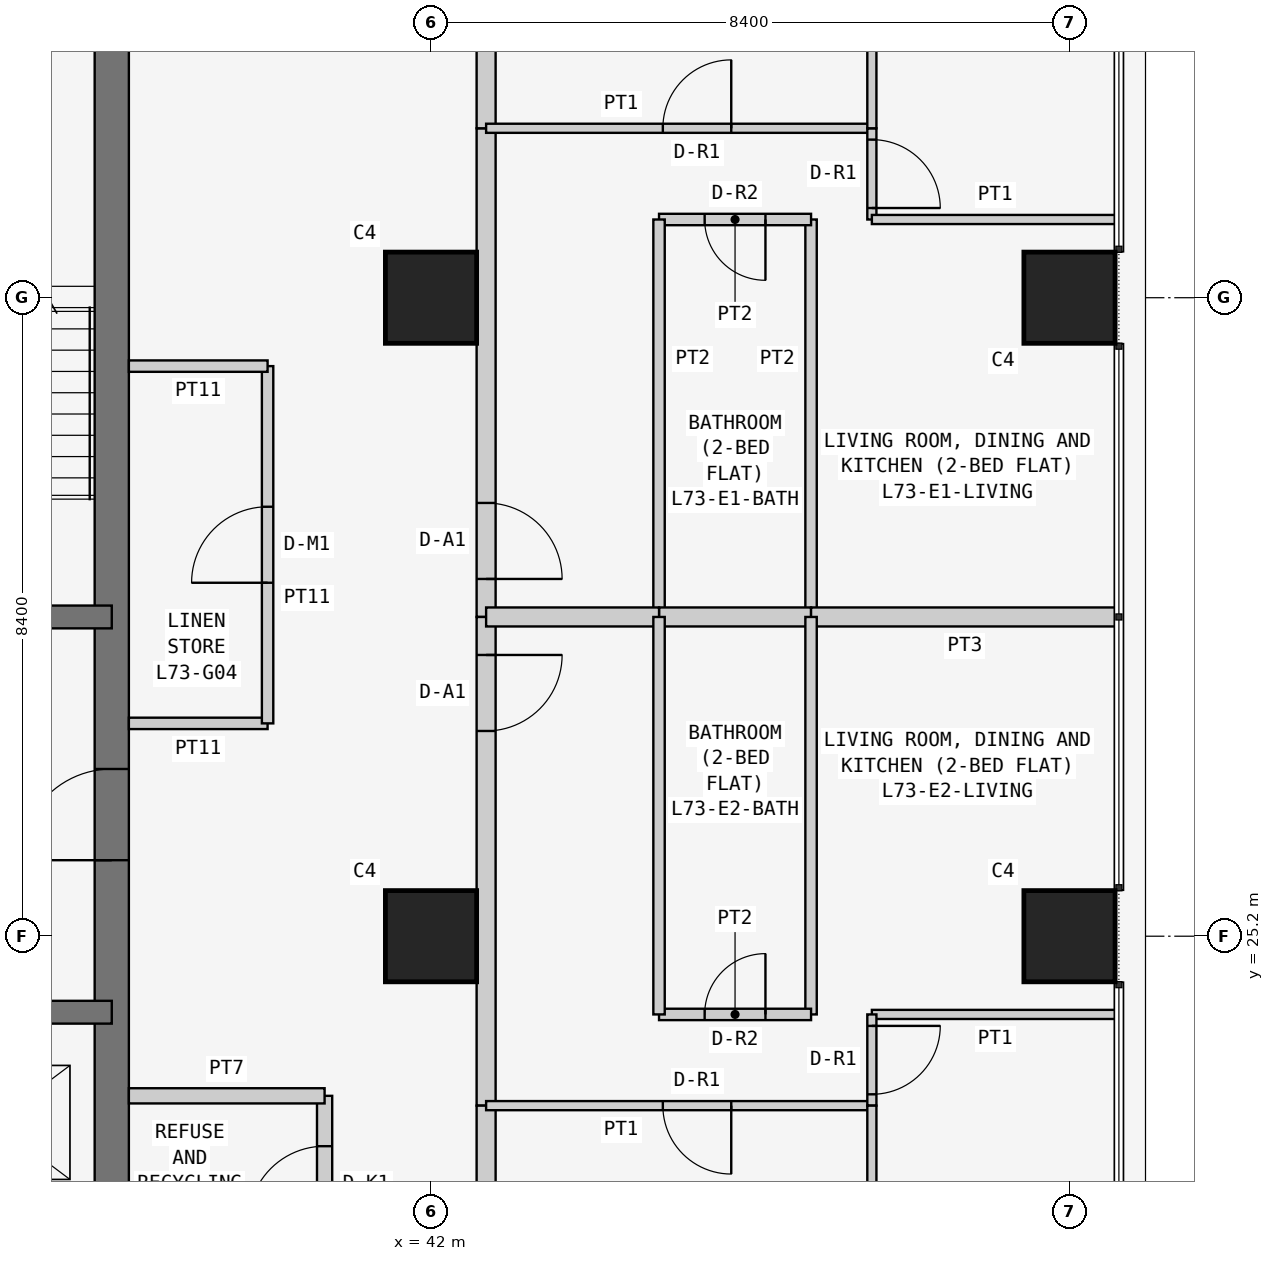
"""IFC4 building model, lengths in metres.
Left out: names, types, materials, properties, quantities, classifications, styles, units other than length and angle.
Written with IfcOpenShell. Run it as: python <this file> out.ifc"""

import sys

from ifc_helpers import new_model, si_unit, direction, frame, frame_2d, origin, origin_2d, place, context, subcontext, project, spatial, rectangle, extrude, element, fill, save


model = new_model("IFC4")
c1 = context("Model", 3, precision=1e-05, world=origin(), true_north=direction((0.0, 1.0)))
c2 = subcontext(c1, "Body", "Model", "MODEL_VIEW")
j1 = project(units=[si_unit("LENGTHUNIT", "METRE"), si_unit("PLANEANGLEUNIT", "RADIAN")], contexts=[c1])
p1 = place(None, origin())
s1 = spatial("IfcSite", under=j1, at=p1, CompositionType="ELEMENT")
p2 = place(p1, origin())
s2 = spatial("IfcBuilding", under=s1, at=p2, CompositionType="ELEMENT")
p3 = place(p2, frame((0.0, 0.0, 279.3)))
s3 = spatial("IfcBuildingStorey", under=s2, at=p3, CompositionType="ELEMENT", Elevation=279.3)
for number, where, z_axis, x_axis in (
    (1, (42.0, 25.2, 0.0), (0.0, 0.0, 1.0), (1.0, 0.0, 0.0)),
    (2, (42.0, 33.6, 0.0), (0.0, 0.0, 1.0), (1.0, 0.0, 0.0)),
    (3, (50.4, 25.2, 0.0), (0.0, 0.0, 1.0), (1.0, 0.0, 0.0)),
    (4, (50.4, 33.6, 0.0), (0.0, 0.0, 1.0), (1.0, 0.0, 0.0)),
):
    element("IfcColumn", number, at=place(p3, frame(where, z_axis=z_axis, x_axis=x_axis)), inside=s3, PredefinedType="COLUMN", context=c2, shape_type="SweptSolid", body=[
        extrude(rectangle(XDim=1.2, YDim=1.2, at=origin_2d()), origin(), (0.0, 0.0, 1.0), 3.6),
    ])
p4 = place(p3, frame((37.8, 21.0, 0.0), z_axis=(0.0, 0.0, 1.0), x_axis=(0.0, 1.0, 0.0)))
e5 = element("IfcWall", 5, at=p4, inside=s3, PredefinedType="SHEAR", context=c2, shape_type="SweptSolid", body=[
    extrude(rectangle(XDim=17.025, YDim=0.45, at=frame_2d((8.512, 0.0))), origin(), (0.0, 0.0, 1.0), 3.6),
])
p5 = place(p4, frame((5.2, 0.0, 0.0)))
e6 = element("IfcOpeningElement", 6, at=p5, cuts=e5, PredefinedType="OPENING", context=c2, shape_type="SweptSolid", body=[
    extrude(rectangle(XDim=1.2, YDim=2.1, at=frame_2d((0.6, 1.05))), frame((0.0, 0.235, 0.0), z_axis=(0.0, -1.0, 0.0), x_axis=(1.0, 0.0, 0.0)), (0.0, 0.0, 1.0), 0.47),
])
p6 = place(p3, frame((26.6, 24.2, 0.0), z_axis=(0.0, 0.0, 1.0), x_axis=(1.0, 0.0, 0.0)))
e7 = element("IfcWall", 7, at=p6, inside=s3, PredefinedType="SHEAR", context=c2, shape_type="SweptSolid", body=[
    extrude(rectangle(XDim=11.2, YDim=0.3, at=frame_2d((5.6, 0.0))), origin(), (0.0, 0.0, 1.0), 3.6),
])
p7 = place(p6, frame((0.913, 0.0, 0.0)))
e8 = element("IfcOpeningElement", 8, at=p7, cuts=e7, PredefinedType="OPENING", context=c2, shape_type="SweptSolid", body=[
    extrude(rectangle(XDim=1.0, YDim=2.1, at=frame_2d((0.5, 1.05))), frame((0.0, 0.16, 0.0), z_axis=(0.0, -1.0, 0.0), x_axis=(1.0, 0.0, 0.0)), (0.0, 0.0, 1.0), 0.32),
])
p8 = place(p6, frame((3.7, 0.0, 0.0)))
e9 = element("IfcOpeningElement", 9, at=p8, cuts=e7, PredefinedType="OPENING", context=c2, shape_type="SweptSolid", body=[
    extrude(rectangle(XDim=1.0, YDim=2.1, at=frame_2d((0.5, 1.05))), frame((0.0, 0.16, 0.0), z_axis=(0.0, -1.0, 0.0), x_axis=(1.0, 0.0, 0.0)), (0.0, 0.0, 1.0), 0.32),
])
p9 = place(p6, frame((6.5, 0.0, 0.0)))
e10 = element("IfcOpeningElement", 10, at=p9, cuts=e7, PredefinedType="OPENING", context=c2, shape_type="SweptSolid", body=[
    extrude(rectangle(XDim=1.0, YDim=2.1, at=frame_2d((0.5, 1.05))), frame((0.0, 0.16, 0.0), z_axis=(0.0, -1.0, 0.0), x_axis=(1.0, 0.0, 0.0)), (0.0, 0.0, 1.0), 0.32),
])
p10 = place(p6, frame((9.1, 0.0, 0.0)))
e11 = element("IfcOpeningElement", 11, at=p10, cuts=e7, PredefinedType="OPENING", context=c2, shape_type="SweptSolid", body=[
    extrude(rectangle(XDim=1.1, YDim=2.1, at=frame_2d((0.55, 1.05))), frame((0.0, 0.16, 0.0), z_axis=(0.0, -1.0, 0.0), x_axis=(1.0, 0.0, 0.0)), (0.0, 0.0, 1.0), 0.32),
])
p11 = place(p3, frame((32.2, 29.4, 0.0), z_axis=(0.0, 0.0, 1.0), x_axis=(1.0, 0.0, 0.0)))
e12 = element("IfcWall", 12, at=p11, inside=s3, PredefinedType="SHEAR", context=c2, shape_type="SweptSolid", body=[
    extrude(rectangle(XDim=5.6, YDim=0.3, at=frame_2d((2.8, 0.0))), origin(), (0.0, 0.0, 1.0), 3.6),
])
p12 = place(p11, frame((2.0, 0.0, 0.0)))
e13 = element("IfcOpeningElement", 13, at=p12, cuts=e12, PredefinedType="OPENING", context=c2, shape_type="SweptSolid", body=[
    extrude(rectangle(XDim=1.2, YDim=2.1, at=frame_2d((0.6, 1.05))), frame((0.0, 0.16, 0.0), z_axis=(0.0, -1.0, 0.0), x_axis=(1.0, 0.0, 0.0)), (0.0, 0.0, 1.0), 0.32),
])
p13 = place(p3, frame((40.6, 20.775, 0.0), z_axis=(0.0, 0.0, 1.0), x_axis=(0.0, 1.0, 0.0)))
e14 = element("IfcWall", 14, at=p13, inside=s3, PredefinedType="PARTITIONING", context=c2, shape_type="SweptSolid", body=[
    extrude(rectangle(XDim=2.325, YDim=0.2, at=frame_2d((1.163, 0.0))), origin(), (0.0, 0.0, 1.0), 3.45),
])
p14 = place(p13, frame((0.663, 0.0, 0.0)))
e15 = element("IfcOpeningElement", 15, at=p14, cuts=e14, PredefinedType="OPENING", context=c2, shape_type="SweptSolid", body=[
    extrude(rectangle(XDim=1.0, YDim=2.1, at=frame_2d((0.5, 1.05))), frame((0.0, 0.11, 0.0), z_axis=(0.0, -1.0, 0.0), x_axis=(1.0, 0.0, 0.0)), (0.0, 0.0, 1.0), 0.22),
])
p15 = place(p3, frame((40.6, 23.1, 0.0), z_axis=(0.0, 0.0, 1.0), x_axis=(-1.0, 0.0, 0.0)))
e16 = element("IfcWall", 16, at=p15, inside=s3, PredefinedType="PARTITIONING", context=c2, shape_type="SweptSolid", body=[
    extrude(rectangle(XDim=2.575, YDim=0.2, at=frame_2d((1.288, 0.0))), origin(), (0.0, 0.0, 1.0), 3.45),
])
p16 = place(p3, frame((38.025, 28.0, 0.0), z_axis=(0.0, 0.0, 1.0), x_axis=(1.0, 0.0, 0.0)))
e17 = element("IfcWall", 17, at=p16, inside=s3, PredefinedType="PARTITIONING", context=c2, shape_type="SweptSolid", body=[
    extrude(rectangle(XDim=1.825, YDim=0.15, at=frame_2d((0.913, 0.0))), origin(), (0.0, 0.0, 1.0), 3.45),
])
p17 = place(p3, frame((39.85, 28.0, 0.0), z_axis=(0.0, 0.0, 1.0), x_axis=(0.0, 1.0, 0.0)))
e18 = element("IfcWall", 18, at=p17, inside=s3, PredefinedType="PARTITIONING", context=c2, shape_type="SweptSolid", body=[
    extrude(rectangle(XDim=4.7, YDim=0.15, at=frame_2d((2.35, 0.0))), origin(), (0.0, 0.0, 1.0), 3.45),
])
p18 = place(p17, frame((1.85, 0.0, 0.0)))
e19 = element("IfcOpeningElement", 19, at=p18, cuts=e18, PredefinedType="OPENING", context=c2, shape_type="SweptSolid", body=[
    extrude(rectangle(XDim=1.0, YDim=2.1, at=frame_2d((0.5, 1.05))), frame((0.0, 0.085, 0.0), z_axis=(0.0, -1.0, 0.0), x_axis=(1.0, 0.0, 0.0)), (0.0, 0.0, 1.0), 0.17),
])
p19 = place(p3, frame((39.85, 32.7, 0.0), z_axis=(0.0, 0.0, 1.0), x_axis=(-1.0, 0.0, 0.0)))
e20 = element("IfcWall", 20, at=p19, inside=s3, PredefinedType="PARTITIONING", context=c2, shape_type="SweptSolid", body=[
    extrude(rectangle(XDim=1.825, YDim=0.15, at=frame_2d((0.913, 0.0))), origin(), (0.0, 0.0, 1.0), 3.45),
])
p20 = place(p3, frame((42.725, 35.829, 0.0), z_axis=(0.0, 0.0, 1.0), x_axis=(0.0, -1.0, 0.0)))
e21 = element("IfcWall", 21, at=p20, inside=s3, PredefinedType="PARTITIONING", context=c2, shape_type="SweptSolid", body=[
    extrude(rectangle(XDim=6.429, YDim=0.25, at=frame_2d((3.215, 0.0))), origin(), (0.0, 0.0, 1.0), 3.45),
])
p21 = place(p20, frame((4.929, 0.0, 0.0)))
e22 = element("IfcOpeningElement", 22, at=p21, cuts=e21, PredefinedType="OPENING", context=c2, shape_type="SweptSolid", body=[
    extrude(rectangle(XDim=1.0, YDim=2.1, at=frame_2d((0.5, 1.05))), frame((0.0, 0.135, 0.0), z_axis=(0.0, -1.0, 0.0), x_axis=(1.0, 0.0, 0.0)), (0.0, 0.0, 1.0), 0.27),
])
p22 = place(p3, frame((42.725, 42.7, 0.0), z_axis=(0.0, 0.0, 1.0), x_axis=(0.0, -1.0, 0.0)))
e23 = element("IfcWall", 23, at=p22, inside=s3, PredefinedType="PARTITIONING", context=c2, shape_type="SweptSolid", body=[
    extrude(rectangle(XDim=6.871, YDim=0.25, at=frame_2d((3.436, 0.0))), origin(), (0.0, 0.0, 1.0), 3.45),
])
p23 = place(p3, frame((42.725, 29.4, 0.0), z_axis=(0.0, 0.0, 1.0), x_axis=(0.0, -1.0, 0.0)))
e24 = element("IfcWall", 24, at=p23, inside=s3, PredefinedType="PARTITIONING", context=c2, shape_type="SweptSolid", body=[
    extrude(rectangle(XDim=6.429, YDim=0.25, at=frame_2d((3.214, 0.0))), origin(), (0.0, 0.0, 1.0), 3.45),
])
p24 = place(p23, frame((0.5, 0.0, 0.0)))
e25 = element("IfcOpeningElement", 25, at=p24, cuts=e24, PredefinedType="OPENING", context=c2, shape_type="SweptSolid", body=[
    extrude(rectangle(XDim=1.0, YDim=2.1, at=frame_2d((0.5, 1.05))), frame((0.0, 0.135, 0.0), z_axis=(0.0, -1.0, 0.0), x_axis=(1.0, 0.0, 0.0)), (0.0, 0.0, 1.0), 0.27),
])
p25 = place(p3, frame((42.725, 22.971, 0.0), z_axis=(0.0, 0.0, 1.0), x_axis=(0.0, -1.0, 0.0)))
e26 = element("IfcWall", 26, at=p25, inside=s3, PredefinedType="PARTITIONING", context=c2, shape_type="SweptSolid", body=[
    extrude(rectangle(XDim=6.871, YDim=0.25, at=frame_2d((3.436, 0.0))), origin(), (0.0, 0.0, 1.0), 3.45),
])
p26 = place(p3, frame((47.0, 29.4, 0.0), z_axis=(0.0, 0.0, 1.0), x_axis=(0.0, 1.0, 0.0)))
e27 = element("IfcWall", 27, at=p26, inside=s3, PredefinedType="PARTITIONING", context=c2, shape_type="SweptSolid", body=[
    extrude(rectangle(XDim=5.229, YDim=0.15, at=frame_2d((2.615, 0.0))), origin(), (0.0, 0.0, 1.0), 3.45),
])
p27 = place(p3, frame((47.0, 34.629, 0.0), z_axis=(0.0, 0.0, 1.0), x_axis=(-1.0, 0.0, 0.0)))
e28 = element("IfcWall", 28, at=p27, inside=s3, PredefinedType="PARTITIONING", context=c2, shape_type="SweptSolid", body=[
    extrude(rectangle(XDim=2.0, YDim=0.15, at=frame_2d((1.0, 0.0))), origin(), (0.0, 0.0, 1.0), 3.45),
])
p28 = place(p27, frame((0.6, 0.0, 0.0)))
e29 = element("IfcOpeningElement", 29, at=p28, cuts=e28, PredefinedType="OPENING", context=c2, shape_type="SweptSolid", body=[
    extrude(rectangle(XDim=0.8, YDim=2.1, at=frame_2d((0.4, 1.05))), frame((0.0, 0.085, 0.0), z_axis=(0.0, -1.0, 0.0), x_axis=(1.0, 0.0, 0.0)), (0.0, 0.0, 1.0), 0.17),
])
p29 = place(p3, frame((45.0, 34.629, 0.0), z_axis=(0.0, 0.0, 1.0), x_axis=(0.0, -1.0, 0.0)))
e30 = element("IfcWall", 30, at=p29, inside=s3, PredefinedType="PARTITIONING", context=c2, shape_type="SweptSolid", body=[
    extrude(rectangle(XDim=5.229, YDim=0.15, at=frame_2d((2.615, 0.0))), origin(), (0.0, 0.0, 1.0), 3.45),
])
p30 = place(p3, frame((45.0, 29.4, 0.0), z_axis=(0.0, 0.0, 1.0), x_axis=(1.0, 0.0, 0.0)))
e31 = element("IfcWall", 31, at=p30, inside=s3, PredefinedType="PARTITIONING", context=c2, shape_type="SweptSolid", body=[
    extrude(rectangle(XDim=2.0, YDim=0.25, at=frame_2d((1.0, 0.0))), origin(), (0.0, 0.0, 1.0), 3.45),
])
p31 = place(p3, frame((42.725, 35.829, 0.0), z_axis=(0.0, 0.0, 1.0), x_axis=(1.0, 0.0, 0.0)))
e32 = element("IfcWall", 32, at=p31, inside=s3, PredefinedType="PARTITIONING", context=c2, shape_type="SweptSolid", body=[
    extrude(rectangle(XDim=5.075, YDim=0.12, at=frame_2d((2.538, 0.0))), origin(), (0.0, 0.0, 1.0), 3.45),
])
p32 = place(p31, frame((2.325, 0.0, 0.0)))
e33 = element("IfcOpeningElement", 33, at=p32, cuts=e32, PredefinedType="OPENING", context=c2, shape_type="SweptSolid", body=[
    extrude(rectangle(XDim=0.9, YDim=2.1, at=frame_2d((0.45, 1.05))), frame((0.0, 0.07, 0.0), z_axis=(0.0, -1.0, 0.0), x_axis=(1.0, 0.0, 0.0)), (0.0, 0.0, 1.0), 0.14),
])
p33 = place(p3, frame((47.8, 35.829, 0.0), z_axis=(0.0, 0.0, 1.0), x_axis=(0.0, -1.0, 0.0)))
e34 = element("IfcWall", 34, at=p33, inside=s3, PredefinedType="PARTITIONING", context=c2, shape_type="SweptSolid", body=[
    extrude(rectangle(XDim=1.2, YDim=0.12, at=frame_2d((0.6, 0.0))), origin(), (0.0, 0.0, 1.0), 3.45),
])
p34 = place(p33, frame((0.149, 0.0, 0.0)))
e35 = element("IfcOpeningElement", 35, at=p34, cuts=e34, PredefinedType="OPENING", context=c2, shape_type="SweptSolid", body=[
    extrude(rectangle(XDim=0.9, YDim=2.1, at=frame_2d((0.45, 1.05))), frame((0.0, 0.07, 0.0), z_axis=(0.0, -1.0, 0.0), x_axis=(1.0, 0.0, 0.0)), (0.0, 0.0, 1.0), 0.14),
])
p35 = place(p3, frame((47.8, 34.629, 0.0), z_axis=(0.0, 0.0, 1.0), x_axis=(1.0, 0.0, 0.0)))
e36 = element("IfcWall", 36, at=p35, inside=s3, PredefinedType="PARTITIONING", context=c2, shape_type="SweptSolid", body=[
    extrude(rectangle(XDim=3.25, YDim=0.12, at=frame_2d((1.625, 0.0))), origin(), (0.0, 0.0, 1.0), 3.45),
])
p36 = place(p3, frame((45.0, 29.4, 0.0), z_axis=(0.0, 0.0, 1.0), x_axis=(-1.0, 0.0, 0.0)))
e37 = element("IfcWall", 37, at=p36, inside=s3, PredefinedType="PARTITIONING", context=c2, shape_type="SweptSolid", body=[
    extrude(rectangle(XDim=2.275, YDim=0.25, at=frame_2d((1.137, 0.0))), origin(), (0.0, 0.0, 1.0), 3.45),
])
p37 = place(p3, frame((51.05, 29.4, 0.0), z_axis=(0.0, 0.0, 1.0), x_axis=(-1.0, 0.0, 0.0)))
e38 = element("IfcWall", 38, at=p37, inside=s3, PredefinedType="PARTITIONING", context=c2, shape_type="SweptSolid", body=[
    extrude(rectangle(XDim=4.05, YDim=0.25, at=frame_2d((2.025, 0.0))), origin(), (0.0, 0.0, 1.0), 3.45),
])
p38 = place(p3, frame((47.8, 35.829, 0.0), z_axis=(0.0, 0.0, 1.0), x_axis=(0.0, 1.0, 0.0)))
e39 = element("IfcWall", 39, at=p38, inside=s3, PredefinedType="PARTITIONING", context=c2, shape_type="SweptSolid", body=[
    extrude(rectangle(XDim=6.871, YDim=0.12, at=frame_2d((3.436, 0.0))), origin(), (0.0, 0.0, 1.0), 3.45),
])
p39 = place(p3, frame((47.0, 29.4, 0.0), z_axis=(0.0, 0.0, 1.0), x_axis=(0.0, -1.0, 0.0)))
e40 = element("IfcWall", 40, at=p39, inside=s3, PredefinedType="PARTITIONING", context=c2, shape_type="SweptSolid", body=[
    extrude(rectangle(XDim=5.229, YDim=0.15, at=frame_2d((2.615, 0.0))), origin(), (0.0, 0.0, 1.0), 3.45),
])
p40 = place(p3, frame((47.0, 24.171, 0.0), z_axis=(0.0, 0.0, 1.0), x_axis=(-1.0, 0.0, 0.0)))
e41 = element("IfcWall", 41, at=p40, inside=s3, PredefinedType="PARTITIONING", context=c2, shape_type="SweptSolid", body=[
    extrude(rectangle(XDim=2.0, YDim=0.15, at=frame_2d((1.0, 0.0))), origin(), (0.0, 0.0, 1.0), 3.45),
])
p41 = place(p40, frame((0.6, 0.0, 0.0)))
e42 = element("IfcOpeningElement", 42, at=p41, cuts=e41, PredefinedType="OPENING", context=c2, shape_type="SweptSolid", body=[
    extrude(rectangle(XDim=0.8, YDim=2.1, at=frame_2d((0.4, 1.05))), frame((0.0, 0.085, 0.0), z_axis=(0.0, -1.0, 0.0), x_axis=(1.0, 0.0, 0.0)), (0.0, 0.0, 1.0), 0.17),
])
p42 = place(p3, frame((45.0, 24.171, 0.0), z_axis=(0.0, 0.0, 1.0), x_axis=(0.0, 1.0, 0.0)))
e43 = element("IfcWall", 43, at=p42, inside=s3, PredefinedType="PARTITIONING", context=c2, shape_type="SweptSolid", body=[
    extrude(rectangle(XDim=5.229, YDim=0.15, at=frame_2d((2.615, 0.0))), origin(), (0.0, 0.0, 1.0), 3.45),
])
p43 = place(p3, frame((47.8, 22.971, 0.0), z_axis=(0.0, 0.0, 1.0), x_axis=(-1.0, 0.0, 0.0)))
e44 = element("IfcWall", 44, at=p43, inside=s3, PredefinedType="PARTITIONING", context=c2, shape_type="SweptSolid", body=[
    extrude(rectangle(XDim=5.075, YDim=0.12, at=frame_2d((2.538, 0.0))), origin(), (0.0, 0.0, 1.0), 3.45),
])
p44 = place(p43, frame((1.85, 0.0, 0.0)))
e45 = element("IfcOpeningElement", 45, at=p44, cuts=e44, PredefinedType="OPENING", context=c2, shape_type="SweptSolid", body=[
    extrude(rectangle(XDim=0.9, YDim=2.1, at=frame_2d((0.45, 1.05))), frame((0.0, 0.07, 0.0), z_axis=(0.0, -1.0, 0.0), x_axis=(1.0, 0.0, 0.0)), (0.0, 0.0, 1.0), 0.14),
])
p45 = place(p3, frame((51.05, 24.171, 0.0), z_axis=(0.0, 0.0, 1.0), x_axis=(-1.0, 0.0, 0.0)))
e46 = element("IfcWall", 46, at=p45, inside=s3, PredefinedType="PARTITIONING", context=c2, shape_type="SweptSolid", body=[
    extrude(rectangle(XDim=3.25, YDim=0.12, at=frame_2d((1.625, 0.0))), origin(), (0.0, 0.0, 1.0), 3.45),
])
p46 = place(p3, frame((47.8, 24.171, 0.0), z_axis=(0.0, 0.0, 1.0), x_axis=(0.0, -1.0, 0.0)))
e47 = element("IfcWall", 47, at=p46, inside=s3, PredefinedType="PARTITIONING", context=c2, shape_type="SweptSolid", body=[
    extrude(rectangle(XDim=1.2, YDim=0.12, at=frame_2d((0.6, 0.0))), origin(), (0.0, 0.0, 1.0), 3.45),
])
p47 = place(p46, frame((0.151, 0.0, 0.0)))
e48 = element("IfcOpeningElement", 48, at=p47, cuts=e47, PredefinedType="OPENING", context=c2, shape_type="SweptSolid", body=[
    extrude(rectangle(XDim=0.9, YDim=2.1, at=frame_2d((0.45, 1.05))), frame((0.0, 0.07, 0.0), z_axis=(0.0, -1.0, 0.0), x_axis=(1.0, 0.0, 0.0)), (0.0, 0.0, 1.0), 0.14),
])
p48 = place(p3, frame((47.8, 22.971, 0.0), z_axis=(0.0, 0.0, 1.0), x_axis=(0.0, -1.0, 0.0)))
e49 = element("IfcWall", 49, at=p48, inside=s3, PredefinedType="PARTITIONING", context=c2, shape_type="SweptSolid", body=[
    extrude(rectangle(XDim=6.871, YDim=0.12, at=frame_2d((3.436, 0.0))), origin(), (0.0, 0.0, 1.0), 3.45),
])
p49 = place(p14, origin())
e50 = element("IfcDoor", 50, at=p49, inside=s3, OperationType="SINGLE_SWING_LEFT", PredefinedType="DOOR", context=c2, shape_type="SweptSolid", body=[
    extrude(rectangle(XDim=1.0, YDim=2.1, at=frame_2d((0.5, 1.05))), frame((0.0, 0.025, 0.0), z_axis=(0.0, -1.0, 0.0), x_axis=(1.0, 0.0, 0.0)), (0.0, 0.0, 1.0), 0.05),
])
fill(e15, e50)
p50 = place(p18, origin())
e51 = element("IfcDoor", 51, at=p50, inside=s3, OperationType="SINGLE_SWING_LEFT", PredefinedType="DOOR", context=c2, shape_type="SweptSolid", body=[
    extrude(rectangle(XDim=1.0, YDim=2.1, at=frame_2d((0.5, 1.05))), frame((0.0, 0.025, 0.0), z_axis=(0.0, -1.0, 0.0), x_axis=(1.0, 0.0, 0.0)), (0.0, 0.0, 1.0), 0.05),
])
fill(e19, e51)
p51 = place(p21, origin())
e52 = element("IfcDoor", 52, at=p51, inside=s3, OperationType="SINGLE_SWING_RIGHT", PredefinedType="DOOR", context=c2, shape_type="SweptSolid", body=[
    extrude(rectangle(XDim=1.0, YDim=2.1, at=frame_2d((0.5, 1.05))), frame((0.0, 0.025, 0.0), z_axis=(0.0, -1.0, 0.0), x_axis=(1.0, 0.0, 0.0)), (0.0, 0.0, 1.0), 0.05),
])
fill(e22, e52)
p52 = place(p28, origin())
e53 = element("IfcDoor", 53, at=p52, inside=s3, OperationType="SINGLE_SWING_LEFT", PredefinedType="DOOR", context=c2, shape_type="SweptSolid", body=[
    extrude(rectangle(XDim=0.8, YDim=2.1, at=frame_2d((0.4, 1.05))), frame((0.0, 0.025, 0.0), z_axis=(0.0, -1.0, 0.0), x_axis=(1.0, 0.0, 0.0)), (0.0, 0.0, 1.0), 0.05),
])
fill(e29, e53)
p53 = place(p32, origin())
e54 = element("IfcDoor", 54, at=p53, inside=s3, OperationType="SINGLE_SWING_RIGHT", PredefinedType="DOOR", context=c2, shape_type="SweptSolid", body=[
    extrude(rectangle(XDim=0.9, YDim=2.1, at=frame_2d((0.45, 1.05))), frame((0.0, 0.025, 0.0), z_axis=(0.0, -1.0, 0.0), x_axis=(1.0, 0.0, 0.0)), (0.0, 0.0, 1.0), 0.05),
])
fill(e33, e54)
p54 = place(p34, origin())
e55 = element("IfcDoor", 55, at=p54, inside=s3, OperationType="SINGLE_SWING_RIGHT", PredefinedType="DOOR", context=c2, shape_type="SweptSolid", body=[
    extrude(rectangle(XDim=0.9, YDim=2.1, at=frame_2d((0.45, 1.05))), frame((0.0, 0.025, 0.0), z_axis=(0.0, -1.0, 0.0), x_axis=(1.0, 0.0, 0.0)), (0.0, 0.0, 1.0), 0.05),
])
fill(e35, e55)
p55 = place(p24, origin())
e56 = element("IfcDoor", 56, at=p55, inside=s3, OperationType="SINGLE_SWING_LEFT", PredefinedType="DOOR", context=c2, shape_type="SweptSolid", body=[
    extrude(rectangle(XDim=1.0, YDim=2.1, at=frame_2d((0.5, 1.05))), frame((0.0, 0.025, 0.0), z_axis=(0.0, -1.0, 0.0), x_axis=(1.0, 0.0, 0.0)), (0.0, 0.0, 1.0), 0.05),
])
fill(e25, e56)
p56 = place(p41, frame((0.8, 0.0, 0.0), z_axis=(0.0, 0.0, 1.0), x_axis=(-1.0, 0.0, 0.0)))
e57 = element("IfcDoor", 57, at=p56, inside=s3, OperationType="SINGLE_SWING_RIGHT", PredefinedType="DOOR", context=c2, shape_type="SweptSolid", body=[
    extrude(rectangle(XDim=0.8, YDim=2.1, at=frame_2d((0.4, 1.05))), frame((0.0, 0.025, 0.0), z_axis=(0.0, -1.0, 0.0), x_axis=(1.0, 0.0, 0.0)), (0.0, 0.0, 1.0), 0.05),
])
fill(e42, e57)
p57 = place(p44, origin())
e58 = element("IfcDoor", 58, at=p57, inside=s3, OperationType="SINGLE_SWING_LEFT", PredefinedType="DOOR", context=c2, shape_type="SweptSolid", body=[
    extrude(rectangle(XDim=0.9, YDim=2.1, at=frame_2d((0.45, 1.05))), frame((0.0, 0.025, 0.0), z_axis=(0.0, -1.0, 0.0), x_axis=(1.0, 0.0, 0.0)), (0.0, 0.0, 1.0), 0.05),
])
fill(e45, e58)
p58 = place(p47, origin())
e59 = element("IfcDoor", 59, at=p58, inside=s3, OperationType="SINGLE_SWING_LEFT", PredefinedType="DOOR", context=c2, shape_type="SweptSolid", body=[
    extrude(rectangle(XDim=0.9, YDim=2.1, at=frame_2d((0.45, 1.05))), frame((0.0, 0.025, 0.0), z_axis=(0.0, -1.0, 0.0), x_axis=(1.0, 0.0, 0.0)), (0.0, 0.0, 1.0), 0.05),
])
fill(e48, e59)
p59 = place(p5, origin())
e60 = element("IfcDoor", 60, at=p59, inside=s3, OperationType="SINGLE_SWING_LEFT", PredefinedType="DOOR", context=c2, shape_type="SweptSolid", body=[
    extrude(rectangle(XDim=1.2, YDim=2.1, at=frame_2d((0.6, 1.05))), frame((0.0, 0.025, 0.0), z_axis=(0.0, -1.0, 0.0), x_axis=(1.0, 0.0, 0.0)), (0.0, 0.0, 1.0), 0.05),
])
fill(e6, e60)
save(model, sys.argv[1])
